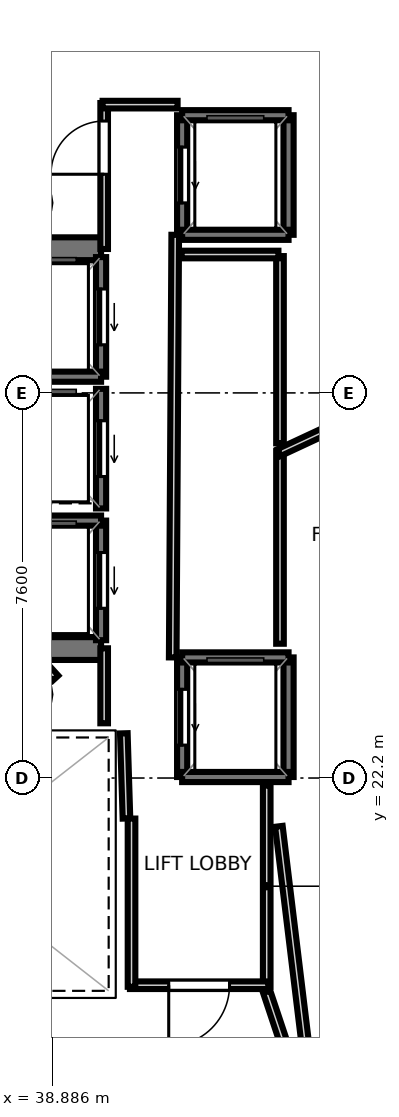
"""IFC4 building model, lengths in metres.
Left out: names, types, materials, properties, quantities, classifications, styles, units other than length and angle.
Written with IfcOpenShell. Run it as: python <this file> out.ifc"""

import sys

from ifc_helpers import new_model, si_unit, direction, frame, frame_2d, origin, place, context, subcontext, project, spatial, rectangle, extrude, element, fill, save


model = new_model("IFC4")
c1 = context("Model", 3, precision=1e-05, world=origin(), true_north=direction((0.0, 1.0)))
c2 = subcontext(c1, "Body", "Model", "MODEL_VIEW")
j1 = project(units=[si_unit("LENGTHUNIT", "METRE"), si_unit("PLANEANGLEUNIT", "RADIAN")], contexts=[c1])
p1 = place(None, origin())
s1 = spatial("IfcSite", under=j1, at=p1, CompositionType="ELEMENT")
p2 = place(p1, origin())
s2 = spatial("IfcBuilding", under=s1, at=p2, CompositionType="ELEMENT")
p3 = place(p2, frame((0.0, 0.0, 321.3)))
s3 = spatial("IfcBuildingStorey", under=s2, at=p3, CompositionType="ELEMENT", Elevation=321.3)
p4 = place(p3, frame((29.33, 32.645, 0.0), z_axis=(0.0, 0.0, 1.0), x_axis=(1.0, 0.0, 0.0)))
e1 = element("IfcWall", 1, at=p4, inside=s3, PredefinedType="SHEAR", context=c2, shape_type="SweptSolid", body=[
    extrude(rectangle(XDim=10.52, YDim=0.45, at=frame_2d((5.26, 0.0))), origin(), (0.0, 0.0, 1.0), 4.42),
])
p5 = place(p4, frame((0.895, 0.0, 0.0)))
e2 = element("IfcOpeningElement", 2, at=p5, cuts=e1, PredefinedType="OPENING", context=c2, shape_type="SweptSolid", body=[
    extrude(rectangle(XDim=1.25, YDim=2.15, at=frame_2d((0.625, 1.075))), frame((0.0, 0.235, 0.0), z_axis=(0.0, -1.0, 0.0), x_axis=(1.0, 0.0, 0.0)), (0.0, 0.0, 1.0), 0.47),
])
p6 = place(p3, frame((29.33, 24.755, 0.0), z_axis=(0.0, 0.0, 1.0), x_axis=(1.0, 0.0, 0.0)))
e3 = element("IfcWall", 3, at=p6, inside=s3, PredefinedType="SHEAR", context=c2, shape_type="SweptSolid", body=[
    extrude(rectangle(XDim=10.52, YDim=0.45, at=frame_2d((5.26, 0.0))), origin(), (0.0, 0.0, 1.0), 4.42),
])
p7 = place(p6, frame((0.695, 0.0, 0.0)))
e4 = element("IfcOpeningElement", 4, at=p7, cuts=e3, PredefinedType="OPENING", context=c2, shape_type="SweptSolid", body=[
    extrude(rectangle(XDim=1.25, YDim=2.15, at=frame_2d((0.625, 1.075))), frame((0.0, 0.235, 0.0), z_axis=(0.0, -1.0, 0.0), x_axis=(1.0, 0.0, 0.0)), (0.0, 0.0, 1.0), 0.47),
])
p8 = place(p3, frame((39.85, 30.12, 0.0), z_axis=(0.0, 0.0, 1.0), x_axis=(0.0, 1.0, 0.0)))
e5 = element("IfcWall", 5, at=p8, inside=s3, PredefinedType="SOLIDWALL", context=c2, shape_type="SweptSolid", body=[
    extrude(rectangle(XDim=2.36, YDim=0.2, at=frame_2d((1.18, 0.0))), origin(), (0.0, 0.0, 1.0), 4.42),
])
p9 = place(p8, frame((0.63, 0.0, 0.0)))
e6 = element("IfcOpeningElement", 6, at=p9, cuts=e5, PredefinedType="OPENING", context=c2, shape_type="SweptSolid", body=[
    extrude(rectangle(XDim=1.1, YDim=2.15, at=frame_2d((0.55, 1.075))), frame((0.0, 0.11, 0.0), z_axis=(0.0, -1.0, 0.0), x_axis=(1.0, 0.0, 0.0)), (0.0, 0.0, 1.0), 0.22),
])
p10 = place(p3, frame((37.75, 30.12, 0.0), z_axis=(0.0, 0.0, 1.0), x_axis=(1.0, 0.0, 0.0)))
e7 = element("IfcWall", 7, at=p10, inside=s3, PredefinedType="SOLIDWALL", context=c2, shape_type="SweptSolid", body=[
    extrude(rectangle(XDim=2.1, YDim=0.2, at=frame_2d((1.05, 0.0))), origin(), (0.0, 0.0, 1.0), 4.42),
])
p11 = place(p3, frame((39.85, 24.92, 0.0), z_axis=(0.0, 0.0, 1.0), x_axis=(0.0, 1.0, 0.0)))
e8 = element("IfcWall", 8, at=p11, inside=s3, PredefinedType="SOLIDWALL", context=c2, shape_type="SweptSolid", body=[
    extrude(rectangle(XDim=2.36, YDim=0.2, at=frame_2d((1.18, 0.0))), origin(), (0.0, 0.0, 1.0), 4.42),
])
p12 = place(p11, frame((0.63, 0.0, 0.0)))
e9 = element("IfcOpeningElement", 9, at=p12, cuts=e8, PredefinedType="OPENING", context=c2, shape_type="SweptSolid", body=[
    extrude(rectangle(XDim=1.1, YDim=2.15, at=frame_2d((0.55, 1.075))), frame((0.0, 0.11, 0.0), z_axis=(0.0, -1.0, 0.0), x_axis=(1.0, 0.0, 0.0)), (0.0, 0.0, 1.0), 0.22),
])
p13 = place(p3, frame((37.75, 27.28, 0.0), z_axis=(0.0, 0.0, 1.0), x_axis=(1.0, 0.0, 0.0)))
e10 = element("IfcWall", 10, at=p13, inside=s3, PredefinedType="SOLIDWALL", context=c2, shape_type="SweptSolid", body=[
    extrude(rectangle(XDim=2.1, YDim=0.2, at=frame_2d((1.05, 0.0))), origin(), (0.0, 0.0, 1.0), 4.42),
])
p14 = place(p3, frame((39.85, 27.52, 0.0), z_axis=(0.0, 0.0, 1.0), x_axis=(0.0, 1.0, 0.0)))
e11 = element("IfcWall", 11, at=p14, inside=s3, PredefinedType="SOLIDWALL", context=c2, shape_type="SweptSolid", body=[
    extrude(rectangle(XDim=2.36, YDim=0.2, at=frame_2d((1.18, 0.0))), origin(), (0.0, 0.0, 1.0), 4.42),
])
p15 = place(p14, frame((0.63, 0.0, 0.0)))
e12 = element("IfcOpeningElement", 12, at=p15, cuts=e11, PredefinedType="OPENING", context=c2, shape_type="SweptSolid", body=[
    extrude(rectangle(XDim=1.1, YDim=2.15, at=frame_2d((0.55, 1.075))), frame((0.0, 0.11, 0.0), z_axis=(0.0, -1.0, 0.0), x_axis=(1.0, 0.0, 0.0)), (0.0, 0.0, 1.0), 0.22),
])
p16 = place(p3, frame((43.55, 22.22, 0.0), z_axis=(0.0, 0.0, 1.0), x_axis=(0.0, 1.0, 0.0)))
e13 = element("IfcWall", 13, at=p16, inside=s3, PredefinedType="SOLIDWALL", context=c2, shape_type="SweptSolid", body=[
    extrude(rectangle(XDim=2.36, YDim=0.2, at=frame_2d((1.18, 0.0))), origin(), (0.0, 0.0, 1.0), 4.42),
])
p17 = place(p3, frame((41.45, 22.22, 0.0), z_axis=(0.0, 0.0, 1.0), x_axis=(0.0, 1.0, 0.0)))
e14 = element("IfcWall", 14, at=p17, inside=s3, PredefinedType="SOLIDWALL", context=c2, shape_type="SweptSolid", body=[
    extrude(rectangle(XDim=2.36, YDim=0.2, at=frame_2d((1.18, 0.0))), origin(), (0.0, 0.0, 1.0), 4.42),
])
p18 = place(p17, frame((0.63, 0.0, 0.0)))
e15 = element("IfcOpeningElement", 15, at=p18, cuts=e14, PredefinedType="OPENING", context=c2, shape_type="SweptSolid", body=[
    extrude(rectangle(XDim=1.1, YDim=2.15, at=frame_2d((0.55, 1.075))), frame((0.0, 0.11, 0.0), z_axis=(0.0, -1.0, 0.0), x_axis=(1.0, 0.0, 0.0)), (0.0, 0.0, 1.0), 0.22),
])
for number, where, z_axis, x_axis in (
    (16, (41.45, 24.58, 0.0), (0.0, 0.0, 1.0), (1.0, 0.0, 0.0)),
    (17, (41.45, 22.22, 0.0), (0.0, 0.0, 1.0), (1.0, 0.0, 0.0)),
):
    element("IfcWall", number, at=place(p3, frame(where, z_axis=z_axis, x_axis=x_axis)), inside=s3, PredefinedType="SOLIDWALL", context=c2, shape_type="SweptSolid", body=[
        extrude(rectangle(XDim=2.1, YDim=0.2, at=frame_2d((1.05, 0.0))), origin(), (0.0, 0.0, 1.0), 4.42),
    ])
p19 = place(p3, frame((43.55, 32.92, 0.0), z_axis=(0.0, 0.0, 1.0), x_axis=(0.0, 1.0, 0.0)))
e18 = element("IfcWall", 18, at=p19, inside=s3, PredefinedType="SOLIDWALL", context=c2, shape_type="SweptSolid", body=[
    extrude(rectangle(XDim=2.36, YDim=0.2, at=frame_2d((1.18, 0.0))), origin(), (0.0, 0.0, 1.0), 4.42),
])
p20 = place(p3, frame((41.45, 32.92, 0.0), z_axis=(0.0, 0.0, 1.0), x_axis=(0.0, 1.0, 0.0)))
e19 = element("IfcWall", 19, at=p20, inside=s3, PredefinedType="SOLIDWALL", context=c2, shape_type="SweptSolid", body=[
    extrude(rectangle(XDim=2.36, YDim=0.2, at=frame_2d((1.18, 0.0))), origin(), (0.0, 0.0, 1.0), 4.42),
])
p21 = place(p20, frame((0.63, 0.0, 0.0)))
e20 = element("IfcOpeningElement", 20, at=p21, cuts=e19, PredefinedType="OPENING", context=c2, shape_type="SweptSolid", body=[
    extrude(rectangle(XDim=1.1, YDim=2.15, at=frame_2d((0.55, 1.075))), frame((0.0, 0.11, 0.0), z_axis=(0.0, -1.0, 0.0), x_axis=(1.0, 0.0, 0.0)), (0.0, 0.0, 1.0), 0.22),
])
for number, where, z_axis, x_axis in (
    (21, (41.45, 35.28, 0.0), (0.0, 0.0, 1.0), (1.0, 0.0, 0.0)),
    (22, (41.45, 32.92, 0.0), (0.0, 0.0, 1.0), (1.0, 0.0, 0.0)),
):
    element("IfcWall", number, at=place(p3, frame(where, z_axis=z_axis, x_axis=x_axis)), inside=s3, PredefinedType="SOLIDWALL", context=c2, shape_type="SweptSolid", body=[
        extrude(rectangle(XDim=2.1, YDim=0.2, at=frame_2d((1.05, 0.0))), origin(), (0.0, 0.0, 1.0), 4.42),
    ])
p22 = place(p3, frame((40.351, 21.401, 0.0), z_axis=(0.0, 0.0, 1.0), x_axis=(-0.031058045979, 0.999517582527, 0.0)))
e23 = element("IfcWall", 23, at=p22, inside=s3, PredefinedType="PARTITIONING", context=c2, shape_type="SweptSolid", body=[
    extrude(rectangle(XDim=1.682, YDim=0.15, at=frame_2d((0.841, 0.0))), origin(), (0.0, 0.0, 1.0), 2.94),
])
p23 = place(p3, frame((39.911, 23.28, 0.0), z_axis=(0.0, 0.0, 1.0), x_axis=(0.0, 1.0, 0.0)))
e24 = element("IfcWall", 24, at=p23, inside=s3, PredefinedType="PARTITIONING", context=c2, shape_type="SweptSolid", body=[
    extrude(rectangle(XDim=1.48, YDim=0.15, at=frame_2d((0.74, 0.0))), origin(), (0.0, 0.0, 1.0), 2.94),
])
p24 = place(p3, frame((39.911, 32.64, 0.0), z_axis=(0.0, 0.0, 1.0), x_axis=(0.0, 1.0, 0.0)))
e25 = element("IfcWall", 25, at=p24, inside=s3, PredefinedType="PARTITIONING", context=c2, shape_type="SweptSolid", body=[
    extrude(rectangle(XDim=2.88, YDim=0.15, at=frame_2d((1.44, 0.0))), origin(), (0.0, 0.0, 1.0), 2.94),
])
p25 = place(p24, frame((1.475, 0.0, 0.0)))
e26 = element("IfcOpeningElement", 26, at=p25, cuts=e25, PredefinedType="OPENING", context=c2, shape_type="SweptSolid", body=[
    extrude(rectangle(XDim=1.05, YDim=2.15, at=frame_2d((0.525, 1.075))), frame((0.0, 0.085, 0.0), z_axis=(0.0, -1.0, 0.0), x_axis=(1.0, 0.0, 0.0)), (0.0, 0.0, 1.0), 0.17),
])
p26 = place(p3, frame((39.88, 35.489, 0.0), z_axis=(0.0, 0.0, 1.0), x_axis=(1.0, 0.0, 0.0)))
e27 = element("IfcWall", 27, at=p26, inside=s3, PredefinedType="PARTITIONING", context=c2, shape_type="SweptSolid", body=[
    extrude(rectangle(XDim=1.48, YDim=0.15, at=frame_2d((0.74, 0.0))), origin(), (0.0, 0.0, 1.0), 2.94),
])
p27 = place(p3, frame((41.313, 32.92, 0.0), z_axis=(0.0, 0.0, 1.0), x_axis=(-0.005942518022, -0.999982343084, 0.0)))
e28 = element("IfcWall", 28, at=p27, inside=s3, PredefinedType="PARTITIONING", context=c2, shape_type="SweptSolid", body=[
    extrude(rectangle(XDim=8.34, YDim=0.15, at=frame_2d((4.17, 0.0))), origin(), (0.0, 0.0, 1.0), 2.94),
])
p28 = place(p3, frame((43.119, 22.05, 0.0), z_axis=(0.0, 0.0, 1.0), x_axis=(0.0, -1.0, 0.0)))
e29 = element("IfcWall", 29, at=p28, inside=s3, PredefinedType="PARTITIONING", context=c2, shape_type="SweptSolid", body=[
    extrude(rectangle(XDim=3.97, YDim=0.15, at=frame_2d((1.985, 0.0))), origin(), (0.0, 0.0, 1.0), 2.94),
])
p29 = place(p3, frame((43.15, 18.111, 0.0), z_axis=(0.0, 0.0, 1.0), x_axis=(-1.0, 0.0, 0.0)))
e30 = element("IfcWall", 30, at=p29, inside=s3, PredefinedType="PARTITIONING", context=c2, shape_type="SweptSolid", body=[
    extrude(rectangle(XDim=2.73, YDim=0.15, at=frame_2d((1.365, 0.0))), origin(), (0.0, 0.0, 1.0), 2.94),
])
p30 = place(p29, frame((0.765, 0.0, 0.0)))
e31 = element("IfcOpeningElement", 31, at=p30, cuts=e30, PredefinedType="OPENING", context=c2, shape_type="SweptSolid", body=[
    extrude(rectangle(XDim=1.2, YDim=2.15, at=frame_2d((0.6, 1.075))), frame((0.0, 0.085, 0.0), z_axis=(0.0, -1.0, 0.0), x_axis=(1.0, 0.0, 0.0)), (0.0, 0.0, 1.0), 0.17),
])
p31 = place(p3, frame((40.451, 18.08, 0.0), z_axis=(0.0, 0.0, 1.0), x_axis=(0.0, 1.0, 0.0)))
e32 = element("IfcWall", 32, at=p31, inside=s3, PredefinedType="PARTITIONING", context=c2, shape_type="SweptSolid", body=[
    extrude(rectangle(XDim=3.32, YDim=0.15, at=frame_2d((1.66, 0.0))), origin(), (0.0, 0.0, 1.0), 2.94),
])
p32 = place(p3, frame((38.951, 24.171, 0.0), z_axis=(0.0, 0.0, 1.0), x_axis=(-0.674186852077, 0.738560822469, 0.0)))
e33 = element("IfcWall", 33, at=p32, inside=s3, PredefinedType="PARTITIONING", context=c2, shape_type="SweptSolid", body=[
    extrude(rectangle(XDim=0.281, YDim=0.15, at=frame_2d((0.14, 0.0))), origin(), (0.0, 0.0, 1.0), 2.94),
])
p33 = place(p3, frame((43.119, 17.98, 0.0), z_axis=(0.0, 0.0, 1.0), x_axis=(0.316719555894, -0.948519226434, 0.0)))
e34 = element("IfcWall", 34, at=p33, inside=s3, PredefinedType="PARTITIONING", context=c2, shape_type="SweptSolid", body=[
    extrude(rectangle(XDim=2.383, YDim=0.15, at=frame_2d((1.191, 0.0))), origin(), (0.0, 0.0, 1.0), 2.94),
])
p34 = place(p3, frame((44.098, 15.16, 0.0), z_axis=(0.0, 0.0, 1.0), x_axis=(-0.120490711947, 0.992714454581, 0.0)))
e35 = element("IfcWall", 35, at=p34, inside=s3, PredefinedType="PARTITIONING", context=c2, shape_type="SweptSolid", body=[
    extrude(rectangle(XDim=6.131, YDim=0.15, at=frame_2d((3.066, 0.0))), origin(), (0.0, 0.0, 1.0), 2.94),
])
p35 = place(p3, frame((43.381, 24.85, 0.0), z_axis=(0.0, 0.0, 1.0), x_axis=(0.0, 1.0, 0.0)))
e36 = element("IfcWall", 36, at=p35, inside=s3, PredefinedType="PARTITIONING", context=c2, shape_type="SweptSolid", body=[
    extrude(rectangle(XDim=3.801, YDim=0.15, at=frame_2d((1.9, 0.0))), origin(), (0.0, 0.0, 1.0), 2.94),
])
p36 = place(p3, frame((43.363, 28.623, 0.0), z_axis=(0.0, 0.0, 1.0), x_axis=(0.906306431774, 0.422621168099, 0.0)))
e37 = element("IfcWall", 37, at=p36, inside=s3, PredefinedType="PARTITIONING", context=c2, shape_type="SweptSolid", body=[
    extrude(rectangle(XDim=9.659, YDim=0.15, at=frame_2d((4.83, 0.0))), origin(), (0.0, 0.0, 1.0), 2.94),
])
p37 = place(p3, frame((46.378, 20.736, 0.0), z_axis=(0.0, 0.0, 1.0), x_axis=(-0.432197648558, -0.901778904489, 0.0)))
e38 = element("IfcWall", 38, at=p37, inside=s3, PredefinedType="PARTITIONING", context=c2, shape_type="SweptSolid", body=[
    extrude(rectangle(XDim=15.164, YDim=0.15, at=frame_2d((7.582, 0.0))), origin(), (0.0, 0.0, 1.0), 2.94),
])
p38 = place(p3, frame((43.381, 28.805, 0.0), z_axis=(0.0, 0.0, 1.0), x_axis=(0.0, 1.0, 0.0)))
e39 = element("IfcWall", 39, at=p38, inside=s3, PredefinedType="PARTITIONING", context=c2, shape_type="SweptSolid", body=[
    extrude(rectangle(XDim=3.695, YDim=0.15, at=frame_2d((1.847, 0.0))), origin(), (0.0, 0.0, 1.0), 2.94),
])
p39 = place(p3, frame((43.35, 32.531, 0.0), z_axis=(0.0, 0.0, 1.0), x_axis=(-1.0, 0.0, 0.0)))
e40 = element("IfcWall", 40, at=p39, inside=s3, PredefinedType="PARTITIONING", context=c2, shape_type="SweptSolid", body=[
    extrude(rectangle(XDim=1.91, YDim=0.15, at=frame_2d((0.955, 0.0))), origin(), (0.0, 0.0, 1.0), 2.94),
])
p40 = place(p9, origin())
e41 = element("IfcDoor", 41, at=p40, inside=s3, OperationType="SLIDING_TO_LEFT", PredefinedType="DOOR", context=c2, shape_type="SweptSolid", body=[
    extrude(rectangle(XDim=1.1, YDim=2.15, at=frame_2d((0.55, 1.075))), frame((0.0, 0.025, 0.0), z_axis=(0.0, -1.0, 0.0), x_axis=(1.0, 0.0, 0.0)), (0.0, 0.0, 1.0), 0.05),
])
fill(e6, e41)
p41 = place(p12, origin())
e42 = element("IfcDoor", 42, at=p41, inside=s3, OperationType="SLIDING_TO_LEFT", PredefinedType="DOOR", context=c2, shape_type="SweptSolid", body=[
    extrude(rectangle(XDim=1.1, YDim=2.15, at=frame_2d((0.55, 1.075))), frame((0.0, 0.025, 0.0), z_axis=(0.0, -1.0, 0.0), x_axis=(1.0, 0.0, 0.0)), (0.0, 0.0, 1.0), 0.05),
])
fill(e9, e42)
p42 = place(p15, origin())
e43 = element("IfcDoor", 43, at=p42, inside=s3, OperationType="SLIDING_TO_LEFT", PredefinedType="DOOR", context=c2, shape_type="SweptSolid", body=[
    extrude(rectangle(XDim=1.1, YDim=2.15, at=frame_2d((0.55, 1.075))), frame((0.0, 0.025, 0.0), z_axis=(0.0, -1.0, 0.0), x_axis=(1.0, 0.0, 0.0)), (0.0, 0.0, 1.0), 0.05),
])
fill(e12, e43)
p43 = place(p18, origin())
e44 = element("IfcDoor", 44, at=p43, inside=s3, OperationType="SLIDING_TO_LEFT", PredefinedType="DOOR", context=c2, shape_type="SweptSolid", body=[
    extrude(rectangle(XDim=1.1, YDim=2.15, at=frame_2d((0.55, 1.075))), frame((0.0, 0.025, 0.0), z_axis=(0.0, -1.0, 0.0), x_axis=(1.0, 0.0, 0.0)), (0.0, 0.0, 1.0), 0.05),
])
fill(e15, e44)
p44 = place(p21, origin())
e45 = element("IfcDoor", 45, at=p44, inside=s3, OperationType="SLIDING_TO_LEFT", PredefinedType="DOOR", context=c2, shape_type="SweptSolid", body=[
    extrude(rectangle(XDim=1.1, YDim=2.15, at=frame_2d((0.55, 1.075))), frame((0.0, 0.025, 0.0), z_axis=(0.0, -1.0, 0.0), x_axis=(1.0, 0.0, 0.0)), (0.0, 0.0, 1.0), 0.05),
])
fill(e20, e45)
p45 = place(p30, origin())
e46 = element("IfcDoor", 46, at=p45, inside=s3, OperationType="SINGLE_SWING_RIGHT", PredefinedType="DOOR", context=c2, shape_type="SweptSolid", body=[
    extrude(rectangle(XDim=1.2, YDim=2.15, at=frame_2d((0.6, 1.075))), frame((0.0, 0.025, 0.0), z_axis=(0.0, -1.0, 0.0), x_axis=(1.0, 0.0, 0.0)), (0.0, 0.0, 1.0), 0.05),
])
fill(e31, e46)
p46 = place(p25, origin())
e47 = element("IfcDoor", 47, at=p46, inside=s3, OperationType="SINGLE_SWING_LEFT", PredefinedType="DOOR", context=c2, shape_type="SweptSolid", body=[
    extrude(rectangle(XDim=1.05, YDim=2.15, at=frame_2d((0.525, 1.075))), frame((0.0, 0.025, 0.0), z_axis=(0.0, -1.0, 0.0), x_axis=(1.0, 0.0, 0.0)), (0.0, 0.0, 1.0), 0.05),
])
fill(e26, e47)
save(model, sys.argv[1])
